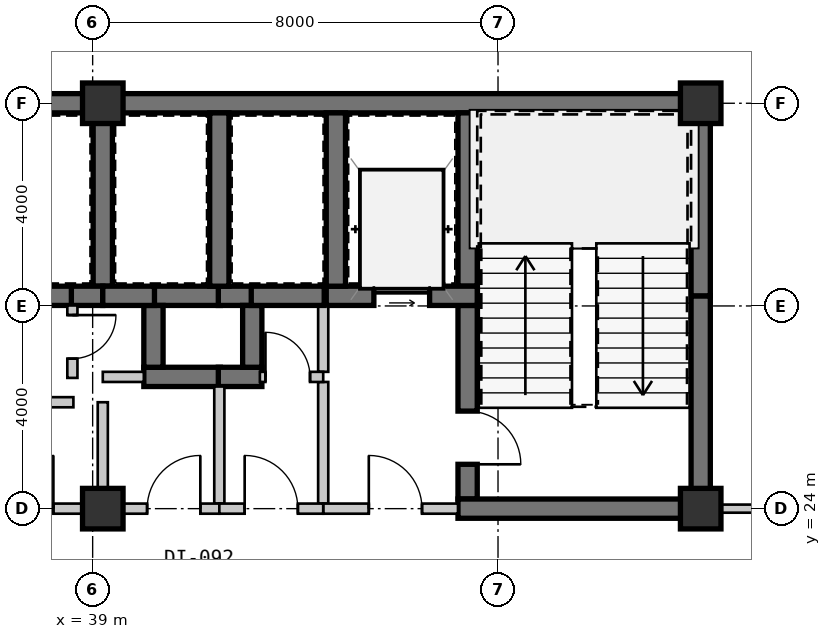
"""IFC4 building model, lengths in metres.
Left out: names, types, materials, properties, quantities, classifications, styles, units other than length and angle.
Written with IfcOpenShell. Run it as: python <this file> out.ifc"""

import sys

from ifc_helpers import new_model, si_unit, direction, frame, frame_2d, origin, origin_2d, place, context, subcontext, project, spatial, rectangle, extrude, source, transform, mapped, element, fill, save


model = new_model("IFC4")
c1 = context("Model", 3, precision=1e-05, world=origin(), true_north=direction((0.0, 1.0)))
c2 = subcontext(c1, "Body", "Model", "MODEL_VIEW")
j1 = project(units=[si_unit("LENGTHUNIT", "METRE"), si_unit("PLANEANGLEUNIT", "RADIAN")], contexts=[c1])
p1 = place(None, origin())
s1 = spatial("IfcSite", under=j1, at=p1, CompositionType="ELEMENT")
p2 = place(p1, origin())
s2 = spatial("IfcBuilding", under=s1, at=p2, CompositionType="ELEMENT")
p3 = place(p2, frame((0.0, 0.0, 26.25)))
s3 = spatial("IfcBuildingStorey", under=s2, at=p3, CompositionType="ELEMENT", Elevation=26.25)
m1 = source(origin(), c2, "Body", "SweptSolid", [
    extrude(rectangle(XDim=0.8, YDim=0.8, at=origin_2d()), origin(), (0.0, 0.0, 1.0), 3.15),
])
for number, where, z_axis, x_axis in (
    (1, (39.2, 24.0, 0.0), (0.0, 0.0, 1.0), (1.0, 0.0, 0.0)),
    (2, (51.0, 24.0, 0.0), (0.0, 0.0, 1.0), (1.0, 0.0, 0.0)),
    (3, (39.2, 32.0, 0.0), (0.0, 0.0, 1.0), (1.0, 0.0, 0.0)),
    (4, (51.0, 32.0, 0.0), (0.0, 0.0, 1.0), (1.0, 0.0, 0.0)),
):
    element("IfcColumn", number, at=place(p3, frame(where, z_axis=z_axis, x_axis=x_axis)), inside=s3, PredefinedType="COLUMN", context=c2, shape_type="MappedRepresentation", body=[
        mapped(m1, transform((0.0, 0.0, 0.0), scale=1.0)),
    ])
m2 = source(origin(), c2, "Body", "SweptSolid", [
    extrude(rectangle(XDim=11.2, YDim=0.38, at=frame_2d((5.6, 0.0))), origin(), (0.0, 0.0, 1.0), 2.93),
])
p4 = place(p3, frame((28.0, 32.0, 0.0), z_axis=(0.0, 0.0, 1.0), x_axis=(1.0, 0.0, 0.0)))
e5 = element("IfcWall", 5, at=p4, inside=s3, PredefinedType="SHEAR", context=c2, shape_type="MappedRepresentation", body=[
    mapped(m2, transform((0.0, 0.0, 0.0), scale=1.0)),
])
m3 = source(origin(), c2, "Body", "SweptSolid", [
    extrude(rectangle(XDim=11.99, YDim=0.38, at=frame_2d((5.995, 0.0))), origin(), (0.0, 0.0, 1.0), 2.93),
])
p5 = place(p3, frame((39.2, 32.0, 0.0), z_axis=(0.0, 0.0, 1.0), x_axis=(1.0, 0.0, 0.0)))
e6 = element("IfcWall", 6, at=p5, inside=s3, PredefinedType="SHEAR", context=c2, shape_type="MappedRepresentation", body=[
    mapped(m3, transform((0.0, 0.0, 0.0), scale=1.0)),
])
m4 = source(origin(), c2, "Body", "SweptSolid", [
    extrude(rectangle(XDim=4.01, YDim=0.38, at=frame_2d((2.005, 0.0))), origin(), (0.0, 0.0, 1.0), 2.93),
])
p6 = place(p3, frame((51.0, 24.19, 0.0), z_axis=(0.0, 0.0, 1.0), x_axis=(0.0, 1.0, 0.0)))
e7 = element("IfcWall", 7, at=p6, inside=s3, PredefinedType="SHEAR", context=c2, shape_type="MappedRepresentation", body=[
    mapped(m4, transform((0.0, 0.0, 0.0), scale=1.0)),
])
m5 = source(origin(), c2, "Body", "SweptSolid", [
    extrude(rectangle(XDim=3.61, YDim=0.38, at=frame_2d((1.805, 0.0))), origin(), (0.0, 0.0, 1.0), 2.93),
])
p7 = place(p3, frame((51.0, 28.2, 0.0), z_axis=(0.0, 0.0, 1.0), x_axis=(0.0, 1.0, 0.0)))
e8 = element("IfcWall", 8, at=p7, inside=s3, PredefinedType="SHEAR", context=c2, shape_type="MappedRepresentation", body=[
    mapped(m5, transform((0.0, 0.0, 0.0), scale=1.0)),
])
m6 = source(origin(), c2, "Body", "SweptSolid", [
    extrude(rectangle(XDim=3.42, YDim=0.38, at=frame_2d((1.71, 0.0))), origin(), (0.0, 0.0, 1.0), 2.93),
])
p8 = place(p3, frame((46.4, 31.81, 0.0), z_axis=(0.0, 0.0, 1.0), x_axis=(0.0, -1.0, 0.0)))
e9 = element("IfcWall", 9, at=p8, inside=s3, PredefinedType="SHEAR", context=c2, shape_type="MappedRepresentation", body=[
    mapped(m6, transform((0.0, 0.0, 0.0), scale=1.0)),
])
m7 = source(origin(), c2, "Body", "SweptSolid", [
    extrude(rectangle(XDim=3.82, YDim=0.38, at=frame_2d((1.91, 0.0))), origin(), (0.0, 0.0, 1.0), 2.93),
])
p9 = place(p3, frame((46.4, 28.01, 0.0), z_axis=(0.0, 0.0, 1.0), x_axis=(0.0, -1.0, 0.0)))
e10 = element("IfcWall", 10, at=p9, inside=s3, PredefinedType="SHEAR", context=c2, shape_type="MappedRepresentation", body=[
    mapped(m7, transform((0.0, 0.0, 0.0), scale=1.0)),
])
m8 = source(origin(), c2, "Body", "SweptSolid", [
    extrude(rectangle(XDim=1.05, YDim=2.1, at=frame_2d((0.525, 1.05))), frame((0.0, 0.2, 0.0), z_axis=(0.0, -1.0, 0.0), x_axis=(1.0, 0.0, 0.0)), (0.0, 0.0, 1.0), 0.4),
])
p10 = place(p9, frame((2.085, 0.0, 0.0)))
e11 = element("IfcOpeningElement", 11, at=p10, cuts=e10, PredefinedType="OPENING", context=c2, shape_type="MappedRepresentation", body=[
    mapped(m8, transform((0.0, 0.0, 0.0), scale=1.0)),
])
m9 = source(origin(), c2, "Body", "SweptSolid", [
    extrude(rectangle(XDim=4.98, YDim=0.38, at=frame_2d((2.49, 0.0))), origin(), (0.0, 0.0, 1.0), 2.93),
])
p11 = place(p3, frame((46.21, 24.0, 0.0), z_axis=(0.0, 0.0, 1.0), x_axis=(1.0, 0.0, 0.0)))
e12 = element("IfcWall", 12, at=p11, inside=s3, PredefinedType="SHEAR", context=c2, shape_type="MappedRepresentation", body=[
    mapped(m9, transform((0.0, 0.0, 0.0), scale=1.0)),
])
m10 = source(origin(), c2, "Body", "SweptSolid", [
    extrude(rectangle(XDim=2.98, YDim=0.38, at=frame_2d((1.49, 0.0))), origin(), (0.0, 0.0, 1.0), 2.93),
])
p12 = place(p3, frame((43.61, 28.2, 0.0), z_axis=(0.0, 0.0, 1.0), x_axis=(1.0, 0.0, 0.0)))
e13 = element("IfcWall", 13, at=p12, inside=s3, PredefinedType="SHEAR", context=c2, shape_type="MappedRepresentation", body=[
    mapped(m10, transform((0.0, 0.0, 0.0), scale=1.0)),
])
m11 = source(origin(), c2, "Body", "SweptSolid", [
    extrude(rectangle(XDim=1.1, YDim=2.15, at=frame_2d((0.55, 1.075))), frame((0.0, 0.2, 0.0), z_axis=(0.0, -1.0, 0.0), x_axis=(1.0, 0.0, 0.0)), (0.0, 0.0, 1.0), 0.4),
])
p13 = place(p12, frame((0.94, 0.0, 0.0)))
e14 = element("IfcOpeningElement", 14, at=p13, cuts=e13, PredefinedType="OPENING", context=c2, shape_type="MappedRepresentation", body=[
    mapped(m11, transform((0.0, 0.0, 0.0), scale=1.0)),
])
p14 = place(p3, frame((43.8, 31.81, 0.0), z_axis=(0.0, 0.0, 1.0), x_axis=(0.0, -1.0, 0.0)))
e15 = element("IfcWall", 15, at=p14, inside=s3, PredefinedType="SHEAR", context=c2, shape_type="MappedRepresentation", body=[
    mapped(m6, transform((0.0, 0.0, 0.0), scale=1.0)),
])
m12 = source(origin(), c2, "Body", "SweptSolid", [
    extrude(rectangle(XDim=2.4, YDim=0.2, at=frame_2d((1.2, 0.0))), origin(), (0.0, 0.0, 1.0), 2.93),
])
p15 = place(p3, frame((43.55, 26.5, 0.0), z_axis=(0.0, 0.0, 1.0), x_axis=(0.0, -1.0, 0.0)))
e16 = element("IfcWall", 16, at=p15, inside=s3, PredefinedType="SOLIDWALL", context=c2, shape_type="MappedRepresentation", body=[
    mapped(m12, transform((0.0, 0.0, 0.0), scale=1.0)),
])
m13 = source(origin(), c2, "Body", "SweptSolid", [
    extrude(rectangle(XDim=1.31, YDim=0.2, at=frame_2d((0.655, 0.0))), origin(), (0.0, 0.0, 1.0), 2.93),
])
p16 = place(p3, frame((43.55, 28.01, 0.0), z_axis=(0.0, 0.0, 1.0), x_axis=(0.0, -1.0, 0.0)))
e17 = element("IfcWall", 17, at=p16, inside=s3, PredefinedType="SOLIDWALL", context=c2, shape_type="MappedRepresentation", body=[
    mapped(m13, transform((0.0, 0.0, 0.0), scale=1.0)),
])
m14 = source(origin(), c2, "Body", "SweptSolid", [
    extrude(rectangle(XDim=2.66, YDim=0.2, at=frame_2d((1.33, 0.0))), origin(), (0.0, 0.0, 1.0), 2.397),
])
p17 = place(p3, frame((43.55, 24.0, 0.0), z_axis=(0.0, 0.0, 1.0), x_axis=(1.0, 0.0, 0.0)))
e18 = element("IfcWall", 18, at=p17, inside=s3, PredefinedType="SOLIDWALL", context=c2, shape_type="MappedRepresentation", body=[
    mapped(m14, transform((0.0, 0.0, 0.0), scale=1.0)),
])
m15 = source(origin(), c2, "Body", "SweptSolid", [
    extrude(rectangle(XDim=1.05, YDim=2.1, at=frame_2d((0.525, 1.05))), frame((0.0, 0.11, 0.0), z_axis=(0.0, -1.0, 0.0), x_axis=(1.0, 0.0, 0.0)), (0.0, 0.0, 1.0), 0.22),
])
p18 = place(p17, frame((0.9, 0.0, 0.0)))
e19 = element("IfcOpeningElement", 19, at=p18, cuts=e18, PredefinedType="OPENING", context=c2, shape_type="MappedRepresentation", body=[
    mapped(m15, transform((0.0, 0.0, 0.0), scale=1.0)),
])
m16 = source(origin(), c2, "Body", "SweptSolid", [
    extrude(rectangle(XDim=1.32, YDim=0.38, at=frame_2d((0.66, 0.0))), origin(), (0.0, 0.0, 1.0), 2.93),
])
p19 = place(p3, frame((41.52, 28.2, 0.0), z_axis=(0.0, 0.0, 1.0), x_axis=(-1.0, 0.0, 0.0)))
e20 = element("IfcWall", 20, at=p19, inside=s3, PredefinedType="SHEAR", context=c2, shape_type="MappedRepresentation", body=[
    mapped(m16, transform((0.0, 0.0, 0.0), scale=1.0)),
])
m17 = source(origin(), c2, "Body", "SweptSolid", [
    extrude(rectangle(XDim=0.67, YDim=0.38, at=frame_2d((0.335, 0.0))), origin(), (0.0, 0.0, 1.0), 2.93),
])
p20 = place(p3, frame((42.15, 28.2, 0.0), z_axis=(0.0, 0.0, 1.0), x_axis=(-1.0, 0.0, 0.0)))
e21 = element("IfcWall", 21, at=p20, inside=s3, PredefinedType="SHEAR", context=c2, shape_type="MappedRepresentation", body=[
    mapped(m17, transform((0.0, 0.0, 0.0), scale=1.0)),
])
m18 = source(origin(), c2, "Body", "SweptSolid", [
    extrude(rectangle(XDim=1.51, YDim=0.38, at=frame_2d((0.755, 0.0))), origin(), (0.0, 0.0, 1.0), 2.93),
])
p21 = place(p3, frame((40.01, 26.6, 0.0), z_axis=(0.0, 0.0, 1.0), x_axis=(1.0, 0.0, 0.0)))
e22 = element("IfcWall", 22, at=p21, inside=s3, PredefinedType="SHEAR", context=c2, shape_type="MappedRepresentation", body=[
    mapped(m18, transform((0.0, 0.0, 0.0), scale=1.0)),
])
m19 = source(origin(), c2, "Body", "SweptSolid", [
    extrude(rectangle(XDim=1.22, YDim=0.38, at=frame_2d((0.61, 0.0))), origin(), (0.0, 0.0, 1.0), 2.93),
])
p22 = place(p3, frame((40.2, 28.01, 0.0), z_axis=(0.0, 0.0, 1.0), x_axis=(0.0, -1.0, 0.0)))
e23 = element("IfcWall", 23, at=p22, inside=s3, PredefinedType="SHEAR", context=c2, shape_type="MappedRepresentation", body=[
    mapped(m19, transform((0.0, 0.0, 0.0), scale=1.0)),
])
m20 = source(origin(), c2, "Body", "SweptSolid", [
    extrude(rectangle(XDim=0.86, YDim=0.38, at=frame_2d((0.43, 0.0))), origin(), (0.0, 0.0, 1.0), 2.93),
])
p23 = place(p3, frame((41.48, 26.6, 0.0), z_axis=(0.0, 0.0, 1.0), x_axis=(1.0, 0.0, 0.0)))
e24 = element("IfcWall", 24, at=p23, inside=s3, PredefinedType="SHEAR", context=c2, shape_type="MappedRepresentation", body=[
    mapped(m20, transform((0.0, 0.0, 0.0), scale=1.0)),
])
p24 = place(p3, frame((42.15, 26.79, 0.0), z_axis=(0.0, 0.0, 1.0), x_axis=(0.0, 1.0, 0.0)))
e25 = element("IfcWall", 25, at=p24, inside=s3, PredefinedType="SHEAR", context=c2, shape_type="MappedRepresentation", body=[
    mapped(m19, transform((0.0, 0.0, 0.0), scale=1.0)),
])
p25 = place(p3, frame((39.2, 28.39, 0.0), z_axis=(0.0, 0.0, 1.0), x_axis=(0.0, 1.0, 0.0)))
e26 = element("IfcWall", 26, at=p25, inside=s3, PredefinedType="SHEAR", context=c2, shape_type="MappedRepresentation", body=[
    mapped(m6, transform((0.0, 0.0, 0.0), scale=1.0)),
])
m21 = source(origin(), c2, "Body", "SweptSolid", [
    extrude(rectangle(XDim=1.96, YDim=0.38, at=frame_2d((0.98, 0.0))), origin(), (0.0, 0.0, 1.0), 2.93),
])
p26 = place(p3, frame((36.66, 28.2, 0.0), z_axis=(0.0, 0.0, 1.0), x_axis=(1.0, 0.0, 0.0)))
e27 = element("IfcWall", 27, at=p26, inside=s3, PredefinedType="SHEAR", context=c2, shape_type="MappedRepresentation", body=[
    mapped(m21, transform((0.0, 0.0, 0.0), scale=1.0)),
])
m22 = source(origin(), c2, "Body", "SweptSolid", [
    extrude(rectangle(XDim=0.62, YDim=0.38, at=frame_2d((0.31, 0.0))), origin(), (0.0, 0.0, 1.0), 2.93),
])
p27 = place(p3, frame((38.58, 28.2, 0.0), z_axis=(0.0, 0.0, 1.0), x_axis=(1.0, 0.0, 0.0)))
e28 = element("IfcWall", 28, at=p27, inside=s3, PredefinedType="SHEAR", context=c2, shape_type="MappedRepresentation", body=[
    mapped(m22, transform((0.0, 0.0, 0.0), scale=1.0)),
])
p28 = place(p3, frame((41.5, 28.39, 0.0), z_axis=(0.0, 0.0, 1.0), x_axis=(0.0, 1.0, 0.0)))
e29 = element("IfcWall", 29, at=p28, inside=s3, PredefinedType="SHEAR", context=c2, shape_type="MappedRepresentation", body=[
    mapped(m6, transform((0.0, 0.0, 0.0), scale=1.0)),
])
m23 = source(origin(), c2, "Body", "SweptSolid", [
    extrude(rectangle(XDim=1.02, YDim=0.38, at=frame_2d((0.51, 0.0))), origin(), (0.0, 0.0, 1.0), 2.93),
])
p29 = place(p3, frame((39.2, 28.2, 0.0), z_axis=(0.0, 0.0, 1.0), x_axis=(1.0, 0.0, 0.0)))
e30 = element("IfcWall", 30, at=p29, inside=s3, PredefinedType="SHEAR", context=c2, shape_type="MappedRepresentation", body=[
    mapped(m23, transform((0.0, 0.0, 0.0), scale=1.0)),
])
m24 = source(origin(), c2, "Body", "SweptSolid", [
    extrude(rectangle(XDim=1.44, YDim=0.38, at=frame_2d((0.72, 0.0))), origin(), (0.0, 0.0, 1.0), 2.93),
])
p30 = place(p3, frame((42.13, 28.2, 0.0), z_axis=(0.0, 0.0, 1.0), x_axis=(1.0, 0.0, 0.0)))
e31 = element("IfcWall", 31, at=p30, inside=s3, PredefinedType="SHEAR", context=c2, shape_type="MappedRepresentation", body=[
    mapped(m24, transform((0.0, 0.0, 0.0), scale=1.0)),
])
m25 = source(origin(), c2, "Body", "SweptSolid", [
    extrude(rectangle(XDim=2.42, YDim=0.2, at=frame_2d((1.21, 0.0))), origin(), (0.0, 0.0, 1.0), 2.93),
])
p31 = place(p3, frame((36.2, 26.1, 0.0), z_axis=(0.0, 0.0, 1.0), x_axis=(1.0, 0.0, 0.0)))
e32 = element("IfcWall", 32, at=p31, inside=s3, PredefinedType="SOLIDWALL", context=c2, shape_type="MappedRepresentation", body=[
    mapped(m25, transform((0.0, 0.0, 0.0), scale=1.0)),
])
p32 = place(p31, frame((0.685, 0.0, 0.0)))
e33 = element("IfcOpeningElement", 33, at=p32, cuts=e32, PredefinedType="OPENING", context=c2, shape_type="MappedRepresentation", body=[
    mapped(m15, transform((0.0, 0.0, 0.0), scale=1.0)),
])
m26 = source(origin(), c2, "Body", "SweptSolid", [
    extrude(rectangle(XDim=2.0, YDim=0.2, at=frame_2d((1.0, 0.0))), origin(), (0.0, 0.0, 1.0), 2.47),
])
p33 = place(p3, frame((39.2, 26.1, 0.0), z_axis=(0.0, 0.0, 1.0), x_axis=(0.0, -1.0, 0.0)))
e34 = element("IfcWall", 34, at=p33, inside=s3, PredefinedType="SOLIDWALL", context=c2, shape_type="MappedRepresentation", body=[
    mapped(m26, transform((0.0, 0.0, 0.0), scale=1.0)),
])
m27 = source(origin(), c2, "Body", "SweptSolid", [
    extrude(rectangle(XDim=3.0, YDim=0.2, at=frame_2d((1.5, 0.0))), origin(), (0.0, 0.0, 1.0), 2.47),
])
p34 = place(p3, frame((39.2, 24.0, 0.0), z_axis=(0.0, 0.0, 1.0), x_axis=(-1.0, 0.0, 0.0)))
e35 = element("IfcWall", 35, at=p34, inside=s3, PredefinedType="SOLIDWALL", context=c2, shape_type="MappedRepresentation", body=[
    mapped(m27, transform((0.0, 0.0, 0.0), scale=1.0)),
])
p35 = place(p34, frame((0.975, 0.0, 0.0)))
e36 = element("IfcOpeningElement", 36, at=p35, cuts=e35, PredefinedType="OPENING", context=c2, shape_type="MappedRepresentation", body=[
    mapped(m15, transform((0.0, 0.0, 0.0), scale=1.0)),
])
m28 = source(origin(), c2, "Body", "SweptSolid", [
    extrude(rectangle(XDim=1.43, YDim=0.2, at=frame_2d((0.715, 0.0))), origin(), (0.0, 0.0, 1.0), 2.93),
])
p36 = place(p3, frame((38.6, 28.01, 0.0), z_axis=(0.0, 0.0, 1.0), x_axis=(0.0, -1.0, 0.0)))
e37 = element("IfcWall", 37, at=p36, inside=s3, PredefinedType="SOLIDWALL", context=c2, shape_type="MappedRepresentation", body=[
    mapped(m28, transform((0.0, 0.0, 0.0), scale=1.0)),
])
m29 = source(origin(), c2, "Body", "SweptSolid", [
    extrude(rectangle(XDim=0.86, YDim=2.1, at=frame_2d((0.43, 1.05))), frame((0.0, 0.11, 0.0), z_axis=(0.0, -1.0, 0.0), x_axis=(1.0, 0.0, 0.0)), (0.0, 0.0, 1.0), 0.22),
])
p37 = place(p36, frame((0.19, 0.0, 0.0)))
e38 = element("IfcOpeningElement", 38, at=p37, cuts=e37, PredefinedType="OPENING", context=c2, shape_type="MappedRepresentation", body=[
    mapped(m29, transform((0.0, 0.0, 0.0), scale=1.0)),
])
m30 = source(origin(), c2, "Body", "SweptSolid", [
    extrude(rectangle(XDim=0.81, YDim=0.2, at=frame_2d((0.405, 0.0))), origin(), (0.0, 0.0, 1.0), 2.93),
])
p38 = place(p3, frame((39.2, 26.6, 0.0), z_axis=(0.0, 0.0, 1.0), x_axis=(1.0, 0.0, 0.0)))
e39 = element("IfcWall", 39, at=p38, inside=s3, PredefinedType="SOLIDWALL", context=c2, shape_type="MappedRepresentation", body=[
    mapped(m30, transform((0.0, 0.0, 0.0), scale=1.0)),
])
m31 = source(origin(), c2, "Body", "SweptSolid", [
    extrude(rectangle(XDim=2.31, YDim=0.2, at=frame_2d((1.155, 0.0))), origin(), (0.0, 0.0, 1.0), 2.93),
])
p39 = place(p3, frame((41.5, 26.41, 0.0), z_axis=(0.0, 0.0, 1.0), x_axis=(0.0, -1.0, 0.0)))
e40 = element("IfcWall", 40, at=p39, inside=s3, PredefinedType="SOLIDWALL", context=c2, shape_type="MappedRepresentation", body=[
    mapped(m31, transform((0.0, 0.0, 0.0), scale=1.0)),
])
m32 = source(origin(), c2, "Body", "SweptSolid", [
    extrude(rectangle(XDim=2.3, YDim=0.2, at=frame_2d((1.15, 0.0))), origin(), (0.0, 0.0, 1.0), 2.397),
])
p40 = place(p3, frame((41.5, 24.0, 0.0), z_axis=(0.0, 0.0, 1.0), x_axis=(-1.0, 0.0, 0.0)))
e41 = element("IfcWall", 41, at=p40, inside=s3, PredefinedType="SOLIDWALL", context=c2, shape_type="MappedRepresentation", body=[
    mapped(m32, transform((0.0, 0.0, 0.0), scale=1.0)),
])
p41 = place(p40, frame((0.375, 0.0, 0.0)))
e42 = element("IfcOpeningElement", 42, at=p41, cuts=e41, PredefinedType="OPENING", context=c2, shape_type="MappedRepresentation", body=[
    mapped(m15, transform((0.0, 0.0, 0.0), scale=1.0)),
])
m33 = source(origin(), c2, "Body", "SweptSolid", [
    extrude(rectangle(XDim=1.25, YDim=0.2, at=frame_2d((0.625, 0.0))), origin(), (0.0, 0.0, 1.0), 2.93),
])
p42 = place(p3, frame((42.3, 26.6, 0.0), z_axis=(0.0, 0.0, 1.0), x_axis=(1.0, 0.0, 0.0)))
e43 = element("IfcWall", 43, at=p42, inside=s3, PredefinedType="SOLIDWALL", context=c2, shape_type="MappedRepresentation", body=[
    mapped(m33, transform((0.0, 0.0, 0.0), scale=1.0)),
])
m34 = source(origin(), c2, "Body", "SweptSolid", [
    extrude(rectangle(XDim=0.88, YDim=2.1, at=frame_2d((0.44, 1.05))), frame((0.0, 0.11, 0.0), z_axis=(0.0, -1.0, 0.0), x_axis=(1.0, 0.0, 0.0)), (0.0, 0.0, 1.0), 0.22),
])
p43 = place(p42, frame((0.11, 0.0, 0.0)))
e44 = element("IfcOpeningElement", 44, at=p43, cuts=e43, PredefinedType="OPENING", context=c2, shape_type="MappedRepresentation", body=[
    mapped(m34, transform((0.0, 0.0, 0.0), scale=1.0)),
])
m35 = source(origin(), c2, "Body", "SweptSolid", [
    extrude(rectangle(XDim=2.05, YDim=0.2, at=frame_2d((1.025, 0.0))), origin(), (0.0, 0.0, 1.0), 2.397),
])
p44 = place(p3, frame((43.55, 24.0, 0.0), z_axis=(0.0, 0.0, 1.0), x_axis=(-1.0, 0.0, 0.0)))
e45 = element("IfcWall", 45, at=p44, inside=s3, PredefinedType="SOLIDWALL", context=c2, shape_type="MappedRepresentation", body=[
    mapped(m35, transform((0.0, 0.0, 0.0), scale=1.0)),
])
p45 = place(p44, frame((0.5, 0.0, 0.0)))
e46 = element("IfcOpeningElement", 46, at=p45, cuts=e45, PredefinedType="OPENING", context=c2, shape_type="MappedRepresentation", body=[
    mapped(m15, transform((0.0, 0.0, 0.0), scale=1.0)),
])
m36 = source(origin(), c2, "Body", "SweptSolid", [
    extrude(rectangle(XDim=4.13, YDim=0.16, at=frame_2d((2.065, 0.0))), origin(), (0.0, 0.0, 1.0), 2.93),
])
p46 = place(p3, frame((51.19, 24.0, 0.0), z_axis=(0.0, 0.0, 1.0), x_axis=(1.0, 0.0, 0.0)))
e47 = element("IfcWall", 47, at=p46, inside=s3, PredefinedType="PARTITIONING", context=c2, shape_type="MappedRepresentation", body=[
    mapped(m36, transform((0.0, 0.0, 0.0), scale=1.0)),
])
m37 = source(origin(), c2, "Body", "SweptSolid", [
    extrude(rectangle(XDim=1.05, YDim=2.1, at=frame_2d((0.525, 1.05))), frame((0.0, 0.025, 0.0), z_axis=(0.0, -1.0, 0.0), x_axis=(1.0, 0.0, 0.0)), (0.0, 0.0, 1.0), 0.05),
])
p47 = place(p10, origin())
e48 = element("IfcDoor", 48, at=p47, inside=s3, OperationType="SINGLE_SWING_RIGHT", PredefinedType="DOOR", context=c2, shape_type="MappedRepresentation", body=[
    mapped(m37, transform((0.0, 0.0, 0.0), scale=1.0)),
])
fill(e11, e48)
m38 = source(origin(), c2, "Body", "SweptSolid", [
    extrude(rectangle(XDim=1.1, YDim=2.15, at=frame_2d((0.55, 1.075))), frame((0.0, 0.025, 0.0), z_axis=(0.0, -1.0, 0.0), x_axis=(1.0, 0.0, 0.0)), (0.0, 0.0, 1.0), 0.05),
])
p48 = place(p13, origin())
e49 = element("IfcDoor", 49, at=p48, inside=s3, OperationType="SLIDING_TO_LEFT", PredefinedType="DOOR", context=c2, shape_type="MappedRepresentation", body=[
    mapped(m38, transform((0.0, 0.0, 0.0), scale=1.0)),
])
fill(e14, e49)
p49 = place(p18, origin())
e50 = element("IfcDoor", 50, at=p49, inside=s3, OperationType="SINGLE_SWING_LEFT", PredefinedType="DOOR", context=c2, shape_type="MappedRepresentation", body=[
    mapped(m37, transform((0.0, 0.0, 0.0), scale=1.0)),
])
fill(e19, e50)
p50 = place(p35, frame((1.05, 0.0, 0.0), z_axis=(0.0, 0.0, 1.0), x_axis=(-1.0, 0.0, 0.0)))
e51 = element("IfcDoor", 51, at=p50, inside=s3, OperationType="SINGLE_SWING_RIGHT", PredefinedType="DOOR", context=c2, shape_type="MappedRepresentation", body=[
    mapped(m37, transform((0.0, 0.0, 0.0), scale=1.0)),
])
fill(e36, e51)
p51 = place(p41, frame((1.05, 0.0, 0.0), z_axis=(0.0, 0.0, 1.0), x_axis=(-1.0, 0.0, 0.0)))
e52 = element("IfcDoor", 52, at=p51, inside=s3, OperationType="SINGLE_SWING_RIGHT", PredefinedType="DOOR", context=c2, shape_type="MappedRepresentation", body=[
    mapped(m37, transform((0.0, 0.0, 0.0), scale=1.0)),
])
fill(e42, e52)
m39 = source(origin(), c2, "Body", "SweptSolid", [
    extrude(rectangle(XDim=0.88, YDim=2.1, at=frame_2d((0.44, 1.05))), frame((0.0, 0.025, 0.0), z_axis=(0.0, -1.0, 0.0), x_axis=(1.0, 0.0, 0.0)), (0.0, 0.0, 1.0), 0.05),
])
p52 = place(p43, origin())
e53 = element("IfcDoor", 53, at=p52, inside=s3, OperationType="SINGLE_SWING_LEFT", PredefinedType="DOOR", context=c2, shape_type="MappedRepresentation", body=[
    mapped(m39, transform((0.0, 0.0, 0.0), scale=1.0)),
])
fill(e44, e53)
p53 = place(p45, frame((1.05, 0.0, 0.0), z_axis=(0.0, 0.0, 1.0), x_axis=(-1.0, 0.0, 0.0)))
e54 = element("IfcDoor", 54, at=p53, inside=s3, OperationType="SINGLE_SWING_LEFT", PredefinedType="DOOR", context=c2, shape_type="MappedRepresentation", body=[
    mapped(m37, transform((0.0, 0.0, 0.0), scale=1.0)),
])
fill(e46, e54)
m40 = source(origin(), c2, "Body", "SweptSolid", [
    extrude(rectangle(XDim=0.86, YDim=2.1, at=frame_2d((0.43, 1.05))), frame((0.0, 0.025, 0.0), z_axis=(0.0, -1.0, 0.0), x_axis=(1.0, 0.0, 0.0)), (0.0, 0.0, 1.0), 0.05),
])
p54 = place(p37, origin())
e55 = element("IfcDoor", 55, at=p54, inside=s3, OperationType="SINGLE_SWING_LEFT", PredefinedType="DOOR", context=c2, shape_type="MappedRepresentation", body=[
    mapped(m40, transform((0.0, 0.0, 0.0), scale=1.0)),
])
fill(e38, e55)
save(model, sys.argv[1])
